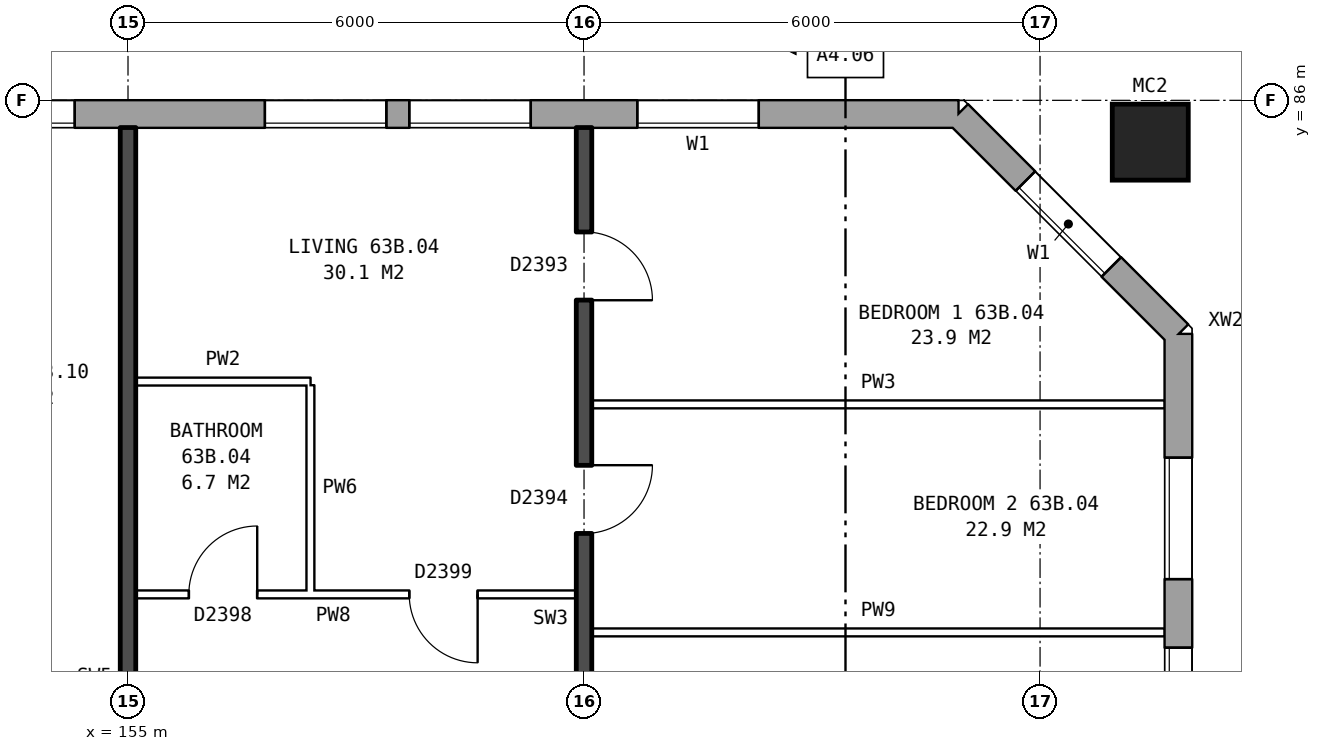
"""IFC4 building model, lengths in metres.
Left out: names, types, materials, properties, quantities, classifications, styles, units other than length and angle.
Written with IfcOpenShell. Run it as: python <this file> out.ifc"""

import sys

from ifc_helpers import new_model, si_unit, direction, frame, frame_2d, origin, origin_2d, place, context, subcontext, project, spatial, rectangle, hollow_rectangle, extrude, element, fill, save


model = new_model("IFC4")
c1 = context("Model", 3, precision=1e-05, world=origin(), true_north=direction((0.0, 1.0)))
c2 = subcontext(c1, "Body", "Model", "MODEL_VIEW")
j1 = project(units=[si_unit("LENGTHUNIT", "METRE"), si_unit("PLANEANGLEUNIT", "RADIAN")], contexts=[c1])
p1 = place(None, origin())
s1 = spatial("IfcSite", under=j1, at=p1, CompositionType="ELEMENT")
p2 = place(p1, origin())
s2 = spatial("IfcBuilding", under=s1, at=p2, CompositionType="ELEMENT")
p3 = place(p2, frame((0.0, 0.0, 224.5)))
s3 = spatial("IfcBuildingStorey", under=s2, at=p3, CompositionType="ELEMENT", Elevation=224.5)
p4 = place(p3, frame((168.45, 85.45, 0.0), z_axis=(0.0, 0.0, 1.0), x_axis=(1.0, 0.0, 0.0)))
e1 = element("IfcColumn", 1, at=p4, inside=s3, PredefinedType="COLUMN", context=c2, shape_type="SweptSolid", body=[
    extrude(hollow_rectangle(XDim=1.0, YDim=1.0, WallThickness=0.055, at=origin_2d()), origin(), (0.0, 0.0, 1.0), 3.1),
])
p5 = place(p3, frame((168.82, 57.075, 0.0), z_axis=(0.0, 0.0, 1.0), x_axis=(0.0, 1.0, 0.0)))
e2 = element("IfcWall", 2, at=p5, inside=s3, PredefinedType="STANDARD", context=c2, shape_type="SweptSolid", body=[
    extrude(rectangle(XDim=25.851, YDim=0.36, at=frame_2d((12.925, 0.0))), origin(), (0.0, 0.0, 1.0), 2.85),
])
p6 = place(p5, frame((1.625, 0.0, 0.8)))
e3 = element("IfcOpeningElement", 3, at=p6, cuts=e2, PredefinedType="OPENING", context=c2, shape_type="SweptSolid", body=[
    extrude(rectangle(XDim=1.6, YDim=1.8, at=frame_2d((0.8, 0.9))), frame((0.0, 0.19, 0.0), z_axis=(0.0, -1.0, 0.0), x_axis=(1.0, 0.0, 0.0)), (0.0, 0.0, 1.0), 0.38),
])
p7 = place(p5, frame((4.075, 0.0, 0.8)))
e4 = element("IfcOpeningElement", 4, at=p7, cuts=e2, PredefinedType="OPENING", context=c2, shape_type="SweptSolid", body=[
    extrude(rectangle(XDim=1.4, YDim=1.8, at=frame_2d((0.7, 0.9))), frame((0.0, 0.19, 0.0), z_axis=(0.0, -1.0, 0.0), x_axis=(1.0, 0.0, 0.0)), (0.0, 0.0, 1.0), 0.38),
])
p8 = place(p5, frame((19.425, 0.0, 0.8)))
e5 = element("IfcOpeningElement", 5, at=p8, cuts=e2, PredefinedType="OPENING", context=c2, shape_type="SweptSolid", body=[
    extrude(rectangle(XDim=0.6, YDim=0.9, at=frame_2d((0.3, 0.45))), frame((0.0, 0.19, 0.0), z_axis=(0.0, -1.0, 0.0), x_axis=(1.0, 0.0, 0.0)), (0.0, 0.0, 1.0), 0.38),
])
p9 = place(p5, frame((22.625, 0.0, 0.8)))
e6 = element("IfcOpeningElement", 6, at=p9, cuts=e2, PredefinedType="OPENING", context=c2, shape_type="SweptSolid", body=[
    extrude(rectangle(XDim=1.6, YDim=1.8, at=frame_2d((0.8, 0.9))), frame((0.0, 0.19, 0.0), z_axis=(0.0, -1.0, 0.0), x_axis=(1.0, 0.0, 0.0)), (0.0, 0.0, 1.0), 0.38),
])
p10 = place(p5, frame((5.775, 0.0, 0.8)))
e7 = element("IfcOpeningElement", 7, at=p10, cuts=e2, PredefinedType="OPENING", context=c2, shape_type="SweptSolid", body=[
    extrude(rectangle(XDim=0.6, YDim=0.9, at=frame_2d((0.3, 0.45))), frame((0.0, 0.19, 0.0), z_axis=(0.0, -1.0, 0.0), x_axis=(1.0, 0.0, 0.0)), (0.0, 0.0, 1.0), 0.38),
])
p11 = place(p5, frame((20.325, 0.0, 0.8)))
e8 = element("IfcOpeningElement", 8, at=p11, cuts=e2, PredefinedType="OPENING", context=c2, shape_type="SweptSolid", body=[
    extrude(rectangle(XDim=1.4, YDim=1.8, at=frame_2d((0.7, 0.9))), frame((0.0, 0.19, 0.0), z_axis=(0.0, -1.0, 0.0), x_axis=(1.0, 0.0, 0.0)), (0.0, 0.0, 1.0), 0.38),
])
p12 = place(p3, frame((168.82, 82.925, 0.0), z_axis=(0.0, 0.0, 1.0), x_axis=(-0.707106781187, 0.707106781187, 0.0)))
e9 = element("IfcWall", 9, at=p12, inside=s3, PredefinedType="STANDARD", context=c2, shape_type="SweptSolid", body=[
    extrude(rectangle(XDim=4.094, YDim=0.36, at=frame_2d((2.047, 0.0))), origin(), (0.0, 0.0, 1.0), 2.85),
])
p13 = place(p12, frame((1.247, 0.0, 0.8)))
e10 = element("IfcOpeningElement", 10, at=p13, cuts=e9, PredefinedType="OPENING", context=c2, shape_type="SweptSolid", body=[
    extrude(rectangle(XDim=1.6, YDim=1.8, at=frame_2d((0.8, 0.9))), frame((0.0, 0.19, 0.0), z_axis=(0.0, -1.0, 0.0), x_axis=(1.0, 0.0, 0.0)), (0.0, 0.0, 1.0), 0.38),
])
p14 = place(p3, frame((165.925, 85.82, 0.0), z_axis=(0.0, 0.0, 1.0), x_axis=(-1.0, 0.0, 0.0)))
e11 = element("IfcWall", 11, at=p14, inside=s3, PredefinedType="STANDARD", context=c2, shape_type="SweptSolid", body=[
    extrude(rectangle(XDim=33.875, YDim=0.36, at=frame_2d((16.938, 0.0))), origin(), (0.0, 0.0, 1.0), 2.85),
])
p15 = place(p14, frame((2.625, 0.0, 0.8)))
e12 = element("IfcOpeningElement", 12, at=p15, cuts=e11, PredefinedType="OPENING", context=c2, shape_type="SweptSolid", body=[
    extrude(rectangle(XDim=1.6, YDim=1.8, at=frame_2d((0.8, 0.9))), frame((0.0, 0.19, 0.0), z_axis=(0.0, -1.0, 0.0), x_axis=(1.0, 0.0, 0.0)), (0.0, 0.0, 1.0), 0.38),
])
p16 = place(p14, frame((5.625, 0.0, 0.8)))
e13 = element("IfcOpeningElement", 13, at=p16, cuts=e11, PredefinedType="OPENING", context=c2, shape_type="SweptSolid", body=[
    extrude(rectangle(XDim=1.6, YDim=1.8, at=frame_2d((0.8, 0.9))), frame((0.0, 0.19, 0.0), z_axis=(0.0, -1.0, 0.0), x_axis=(1.0, 0.0, 0.0)), (0.0, 0.0, 1.0), 0.38),
])
p17 = place(p14, frame((7.525, 0.0, 0.8)))
e14 = element("IfcOpeningElement", 14, at=p17, cuts=e11, PredefinedType="OPENING", context=c2, shape_type="SweptSolid", body=[
    extrude(rectangle(XDim=1.6, YDim=1.8, at=frame_2d((0.8, 0.9))), frame((0.0, 0.19, 0.0), z_axis=(0.0, -1.0, 0.0), x_axis=(1.0, 0.0, 0.0)), (0.0, 0.0, 1.0), 0.38),
])
p18 = place(p14, frame((11.625, 0.0, 0.8)))
e15 = element("IfcOpeningElement", 15, at=p18, cuts=e11, PredefinedType="OPENING", context=c2, shape_type="SweptSolid", body=[
    extrude(rectangle(XDim=1.6, YDim=1.8, at=frame_2d((0.8, 0.9))), frame((0.0, 0.19, 0.0), z_axis=(0.0, -1.0, 0.0), x_axis=(1.0, 0.0, 0.0)), (0.0, 0.0, 1.0), 0.38),
])
p19 = place(p14, frame((14.625, 0.0, 0.8)))
e16 = element("IfcOpeningElement", 16, at=p19, cuts=e11, PredefinedType="OPENING", context=c2, shape_type="SweptSolid", body=[
    extrude(rectangle(XDim=1.6, YDim=1.8, at=frame_2d((0.8, 0.9))), frame((0.0, 0.19, 0.0), z_axis=(0.0, -1.0, 0.0), x_axis=(1.0, 0.0, 0.0)), (0.0, 0.0, 1.0), 0.38),
])
p20 = place(p14, frame((17.625, 0.0, 0.8)))
e17 = element("IfcOpeningElement", 17, at=p20, cuts=e11, PredefinedType="OPENING", context=c2, shape_type="SweptSolid", body=[
    extrude(rectangle(XDim=1.6, YDim=1.8, at=frame_2d((0.8, 0.9))), frame((0.0, 0.19, 0.0), z_axis=(0.0, -1.0, 0.0), x_axis=(1.0, 0.0, 0.0)), (0.0, 0.0, 1.0), 0.38),
])
p21 = place(p14, frame((20.075, 0.0, 0.8)))
e18 = element("IfcOpeningElement", 18, at=p21, cuts=e11, PredefinedType="OPENING", context=c2, shape_type="SweptSolid", body=[
    extrude(rectangle(XDim=0.6, YDim=1.5, at=frame_2d((0.3, 0.75))), frame((0.0, 0.19, 0.0), z_axis=(0.0, -1.0, 0.0), x_axis=(1.0, 0.0, 0.0)), (0.0, 0.0, 1.0), 0.38),
])
p22 = place(p14, frame((23.625, 0.0, 0.8)))
e19 = element("IfcOpeningElement", 19, at=p22, cuts=e11, PredefinedType="OPENING", context=c2, shape_type="SweptSolid", body=[
    extrude(rectangle(XDim=1.6, YDim=1.8, at=frame_2d((0.8, 0.9))), frame((0.0, 0.19, 0.0), z_axis=(0.0, -1.0, 0.0), x_axis=(1.0, 0.0, 0.0)), (0.0, 0.0, 1.0), 0.38),
])
p23 = place(p14, frame((26.625, 0.0, 0.8)))
e20 = element("IfcOpeningElement", 20, at=p23, cuts=e11, PredefinedType="OPENING", context=c2, shape_type="SweptSolid", body=[
    extrude(rectangle(XDim=1.6, YDim=1.8, at=frame_2d((0.8, 0.9))), frame((0.0, 0.19, 0.0), z_axis=(0.0, -1.0, 0.0), x_axis=(1.0, 0.0, 0.0)), (0.0, 0.0, 1.0), 0.38),
])
p24 = place(p14, frame((29.625, 0.0, 0.8)))
e21 = element("IfcOpeningElement", 21, at=p24, cuts=e11, PredefinedType="OPENING", context=c2, shape_type="SweptSolid", body=[
    extrude(rectangle(XDim=1.6, YDim=1.8, at=frame_2d((0.8, 0.9))), frame((0.0, 0.19, 0.0), z_axis=(0.0, -1.0, 0.0), x_axis=(1.0, 0.0, 0.0)), (0.0, 0.0, 1.0), 0.38),
])
p25 = place(p14, frame((22.125, 0.0, 1.7)))
e22 = element("IfcOpeningElement", 22, at=p25, cuts=e11, PredefinedType="OPENING", context=c2, shape_type="SweptSolid", body=[
    extrude(rectangle(XDim=0.6, YDim=0.9, at=frame_2d((0.3, 0.45))), frame((0.0, 0.19, 0.0), z_axis=(0.0, -1.0, 0.0), x_axis=(1.0, 0.0, 0.0)), (0.0, 0.0, 1.0), 0.38),
])
p26 = place(p3, frame((161.1, 79.0, 0.0), z_axis=(0.0, 0.0, 1.0), x_axis=(1.0, 0.0, 0.0)))
e23 = element("IfcWall", 23, at=p26, inside=s3, PredefinedType="PARTITIONING", context=c2, shape_type="SweptSolid", body=[
    extrude(rectangle(XDim=7.54, YDim=0.1, at=frame_2d((3.77, 0.0))), origin(), (0.0, 0.0, 1.0), 2.85),
])
p27 = place(p3, frame((155.1, 79.5, 0.0), z_axis=(0.0, 0.0, 1.0), x_axis=(1.0, 0.0, 0.0)))
e24 = element("IfcWall", 24, at=p27, inside=s3, PredefinedType="PARTITIONING", context=c2, shape_type="SweptSolid", body=[
    extrude(rectangle(XDim=5.8, YDim=0.1, at=frame_2d((2.9, 0.0))), origin(), (0.0, 0.0, 1.0), 2.85),
])
p28 = place(p27, frame((3.6, 0.0, 0.0)))
e25 = element("IfcOpeningElement", 25, at=p28, cuts=e24, PredefinedType="OPENING", context=c2, shape_type="SweptSolid", body=[
    extrude(rectangle(XDim=0.9, YDim=2.1, at=frame_2d((0.45, 1.05))), frame((0.0, 0.06, 0.0), z_axis=(0.0, -1.0, 0.0), x_axis=(1.0, 0.0, 0.0)), (0.0, 0.0, 1.0), 0.12),
])
p29 = place(p27, frame((0.7, 0.0, 0.0)))
e26 = element("IfcOpeningElement", 26, at=p29, cuts=e24, PredefinedType="OPENING", context=c2, shape_type="SweptSolid", body=[
    extrude(rectangle(XDim=0.9, YDim=2.1, at=frame_2d((0.45, 1.05))), frame((0.0, 0.06, 0.0), z_axis=(0.0, -1.0, 0.0), x_axis=(1.0, 0.0, 0.0)), (0.0, 0.0, 1.0), 0.12),
])
p30 = place(p3, frame((161.1, 82.0, 0.0), z_axis=(0.0, 0.0, 1.0), x_axis=(1.0, 0.0, 0.0)))
e27 = element("IfcWall", 27, at=p30, inside=s3, PredefinedType="PARTITIONING", context=c2, shape_type="SweptSolid", body=[
    extrude(rectangle(XDim=7.54, YDim=0.1, at=frame_2d((3.77, 0.0))), origin(), (0.0, 0.0, 1.0), 2.85),
])
p31 = place(p3, frame((155.1, 82.3, 0.0), z_axis=(0.0, 0.0, 1.0), x_axis=(1.0, 0.0, 0.0)))
e28 = element("IfcWall", 28, at=p31, inside=s3, PredefinedType="PARTITIONING", context=c2, shape_type="SweptSolid", body=[
    extrude(rectangle(XDim=2.3, YDim=0.1, at=frame_2d((1.15, 0.0))), origin(), (0.0, 0.0, 1.0), 2.85),
])
p32 = place(p3, frame((155.0, 71.2, 0.0), z_axis=(0.0, 0.0, 1.0), x_axis=(0.0, 1.0, 0.0)))
e29 = element("IfcWall", 29, at=p32, inside=s3, PredefinedType="SOLIDWALL", context=c2, shape_type="SweptSolid", body=[
    extrude(rectangle(XDim=14.44, YDim=0.2, at=frame_2d((7.22, 0.0))), origin(), (0.0, 0.0, 1.0), 2.85),
])
p33 = place(p3, frame((157.4, 79.55, 0.0), z_axis=(0.0, 0.0, 1.0), x_axis=(0.0, 1.0, 0.0)))
e30 = element("IfcWall", 30, at=p33, inside=s3, PredefinedType="PARTITIONING", context=c2, shape_type="SweptSolid", body=[
    extrude(rectangle(XDim=2.7, YDim=0.1, at=frame_2d((1.35, 0.0))), origin(), (0.0, 0.0, 1.0), 2.85),
])
p34 = place(p3, frame((161.0, 76.2, 0.0), z_axis=(0.0, 0.0, 1.0), x_axis=(0.0, 1.0, 0.0)))
e31 = element("IfcWall", 31, at=p34, inside=s3, PredefinedType="SOLIDWALL", context=c2, shape_type="SweptSolid", body=[
    extrude(rectangle(XDim=9.44, YDim=0.2, at=frame_2d((4.72, 0.0))), origin(), (0.0, 0.0, 1.0), 2.85),
])
p35 = place(p34, frame((7.17, 0.0, 0.0)))
e32 = element("IfcOpeningElement", 32, at=p35, cuts=e31, PredefinedType="OPENING", context=c2, shape_type="SweptSolid", body=[
    extrude(rectangle(XDim=0.9, YDim=2.1, at=frame_2d((0.45, 1.05))), frame((0.0, 0.11, 0.0), z_axis=(0.0, -1.0, 0.0), x_axis=(1.0, 0.0, 0.0)), (0.0, 0.0, 1.0), 0.22),
])
p36 = place(p34, frame((4.1, 0.0, 0.0)))
e33 = element("IfcOpeningElement", 33, at=p36, cuts=e31, PredefinedType="OPENING", context=c2, shape_type="SweptSolid", body=[
    extrude(rectangle(XDim=0.9, YDim=2.1, at=frame_2d((0.45, 1.05))), frame((0.0, 0.11, 0.0), z_axis=(0.0, -1.0, 0.0), x_axis=(1.0, 0.0, 0.0)), (0.0, 0.0, 1.0), 0.22),
])
p37 = place(p34, frame((0.95, 0.0, 0.0)))
e34 = element("IfcOpeningElement", 34, at=p37, cuts=e31, PredefinedType="OPENING", context=c2, shape_type="SweptSolid", body=[
    extrude(rectangle(XDim=0.9, YDim=2.1, at=frame_2d((0.45, 1.05))), frame((0.0, 0.11, 0.0), z_axis=(0.0, -1.0, 0.0), x_axis=(1.0, 0.0, 0.0)), (0.0, 0.0, 1.0), 0.22),
])
p38 = place(p9, origin())
e35 = element("IfcWindow", 35, at=p38, inside=s3, PartitioningType="SINGLE_PANEL", PredefinedType="WINDOW", context=c2, shape_type="SweptSolid", body=[
    extrude(rectangle(XDim=1.6, YDim=1.8, at=frame_2d((0.8, 0.9))), frame((0.0, 0.15, 0.0), z_axis=(0.0, -1.0, 0.0), x_axis=(1.0, 0.0, 0.0)), (0.0, 0.0, 1.0), 0.06),
])
fill(e6, e35)
p39 = place(p13, origin())
e36 = element("IfcWindow", 36, at=p39, inside=s3, PartitioningType="SINGLE_PANEL", PredefinedType="WINDOW", context=c2, shape_type="SweptSolid", body=[
    extrude(rectangle(XDim=1.6, YDim=1.8, at=frame_2d((0.8, 0.9))), frame((0.0, 0.15, 0.0), z_axis=(0.0, -1.0, 0.0), x_axis=(1.0, 0.0, 0.0)), (0.0, 0.0, 1.0), 0.06),
])
fill(e10, e36)
p40 = place(p15, origin())
e37 = element("IfcWindow", 37, at=p40, inside=s3, PartitioningType="SINGLE_PANEL", PredefinedType="WINDOW", context=c2, shape_type="SweptSolid", body=[
    extrude(rectangle(XDim=1.6, YDim=1.8, at=frame_2d((0.8, 0.9))), frame((0.0, 0.15, 0.0), z_axis=(0.0, -1.0, 0.0), x_axis=(1.0, 0.0, 0.0)), (0.0, 0.0, 1.0), 0.06),
])
fill(e12, e37)
p41 = place(p16, origin())
e38 = element("IfcWindow", 38, at=p41, inside=s3, PartitioningType="SINGLE_PANEL", PredefinedType="WINDOW", context=c2, shape_type="SweptSolid", body=[
    extrude(rectangle(XDim=1.6, YDim=1.8, at=frame_2d((0.8, 0.9))), frame((0.0, 0.15, 0.0), z_axis=(0.0, -1.0, 0.0), x_axis=(1.0, 0.0, 0.0)), (0.0, 0.0, 1.0), 0.06),
])
fill(e13, e38)
p42 = place(p17, origin())
e39 = element("IfcWindow", 39, at=p42, inside=s3, PartitioningType="SINGLE_PANEL", PredefinedType="WINDOW", context=c2, shape_type="SweptSolid", body=[
    extrude(rectangle(XDim=1.6, YDim=1.8, at=frame_2d((0.8, 0.9))), frame((0.0, 0.15, 0.0), z_axis=(0.0, -1.0, 0.0), x_axis=(1.0, 0.0, 0.0)), (0.0, 0.0, 1.0), 0.06),
])
fill(e14, e39)
p43 = place(p18, origin())
e40 = element("IfcWindow", 40, at=p43, inside=s3, PartitioningType="SINGLE_PANEL", PredefinedType="WINDOW", context=c2, shape_type="SweptSolid", body=[
    extrude(rectangle(XDim=1.6, YDim=1.8, at=frame_2d((0.8, 0.9))), frame((0.0, 0.15, 0.0), z_axis=(0.0, -1.0, 0.0), x_axis=(1.0, 0.0, 0.0)), (0.0, 0.0, 1.0), 0.06),
])
fill(e15, e40)
p44 = place(p35, frame((0.9, 0.0, 0.0), z_axis=(0.0, 0.0, 1.0), x_axis=(-1.0, 0.0, 0.0)))
e41 = element("IfcDoor", 41, at=p44, inside=s3, OperationType="SINGLE_SWING_RIGHT", PredefinedType="DOOR", context=c2, shape_type="SweptSolid", body=[
    extrude(rectangle(XDim=0.9, YDim=2.1, at=frame_2d((0.45, 1.05))), frame((0.0, 0.025, 0.0), z_axis=(0.0, -1.0, 0.0), x_axis=(1.0, 0.0, 0.0)), (0.0, 0.0, 1.0), 0.05),
])
fill(e32, e41)
p45 = place(p36, frame((0.9, 0.0, 0.0), z_axis=(0.0, 0.0, 1.0), x_axis=(-1.0, 0.0, 0.0)))
e42 = element("IfcDoor", 42, at=p45, inside=s3, OperationType="SINGLE_SWING_LEFT", PredefinedType="DOOR", context=c2, shape_type="SweptSolid", body=[
    extrude(rectangle(XDim=0.9, YDim=2.1, at=frame_2d((0.45, 1.05))), frame((0.0, 0.025, 0.0), z_axis=(0.0, -1.0, 0.0), x_axis=(1.0, 0.0, 0.0)), (0.0, 0.0, 1.0), 0.05),
])
fill(e33, e42)
p46 = place(p28, frame((0.9, 0.0, 0.0), z_axis=(0.0, 0.0, 1.0), x_axis=(-1.0, 0.0, 0.0)))
e43 = element("IfcDoor", 43, at=p46, inside=s3, OperationType="SINGLE_SWING_LEFT", PredefinedType="DOOR", context=c2, shape_type="SweptSolid", body=[
    extrude(rectangle(XDim=0.9, YDim=2.1, at=frame_2d((0.45, 1.05))), frame((0.0, 0.025, 0.0), z_axis=(0.0, -1.0, 0.0), x_axis=(1.0, 0.0, 0.0)), (0.0, 0.0, 1.0), 0.05),
])
fill(e25, e43)
p47 = place(p29, origin())
e44 = element("IfcDoor", 44, at=p47, inside=s3, OperationType="SINGLE_SWING_RIGHT", PredefinedType="DOOR", context=c2, shape_type="SweptSolid", body=[
    extrude(rectangle(XDim=0.9, YDim=2.1, at=frame_2d((0.45, 1.05))), frame((0.0, 0.025, 0.0), z_axis=(0.0, -1.0, 0.0), x_axis=(1.0, 0.0, 0.0)), (0.0, 0.0, 1.0), 0.05),
])
fill(e26, e44)
p48 = place(p11, origin())
e45 = element("IfcWindow", 45, at=p48, inside=s3, PartitioningType="SINGLE_PANEL", PredefinedType="WINDOW", context=c2, shape_type="SweptSolid", body=[
    extrude(rectangle(XDim=1.4, YDim=1.8, at=frame_2d((0.7, 0.9))), frame((0.0, 0.15, 0.0), z_axis=(0.0, -1.0, 0.0), x_axis=(1.0, 0.0, 0.0)), (0.0, 0.0, 1.0), 0.06),
])
fill(e8, e45)
save(model, sys.argv[1])
